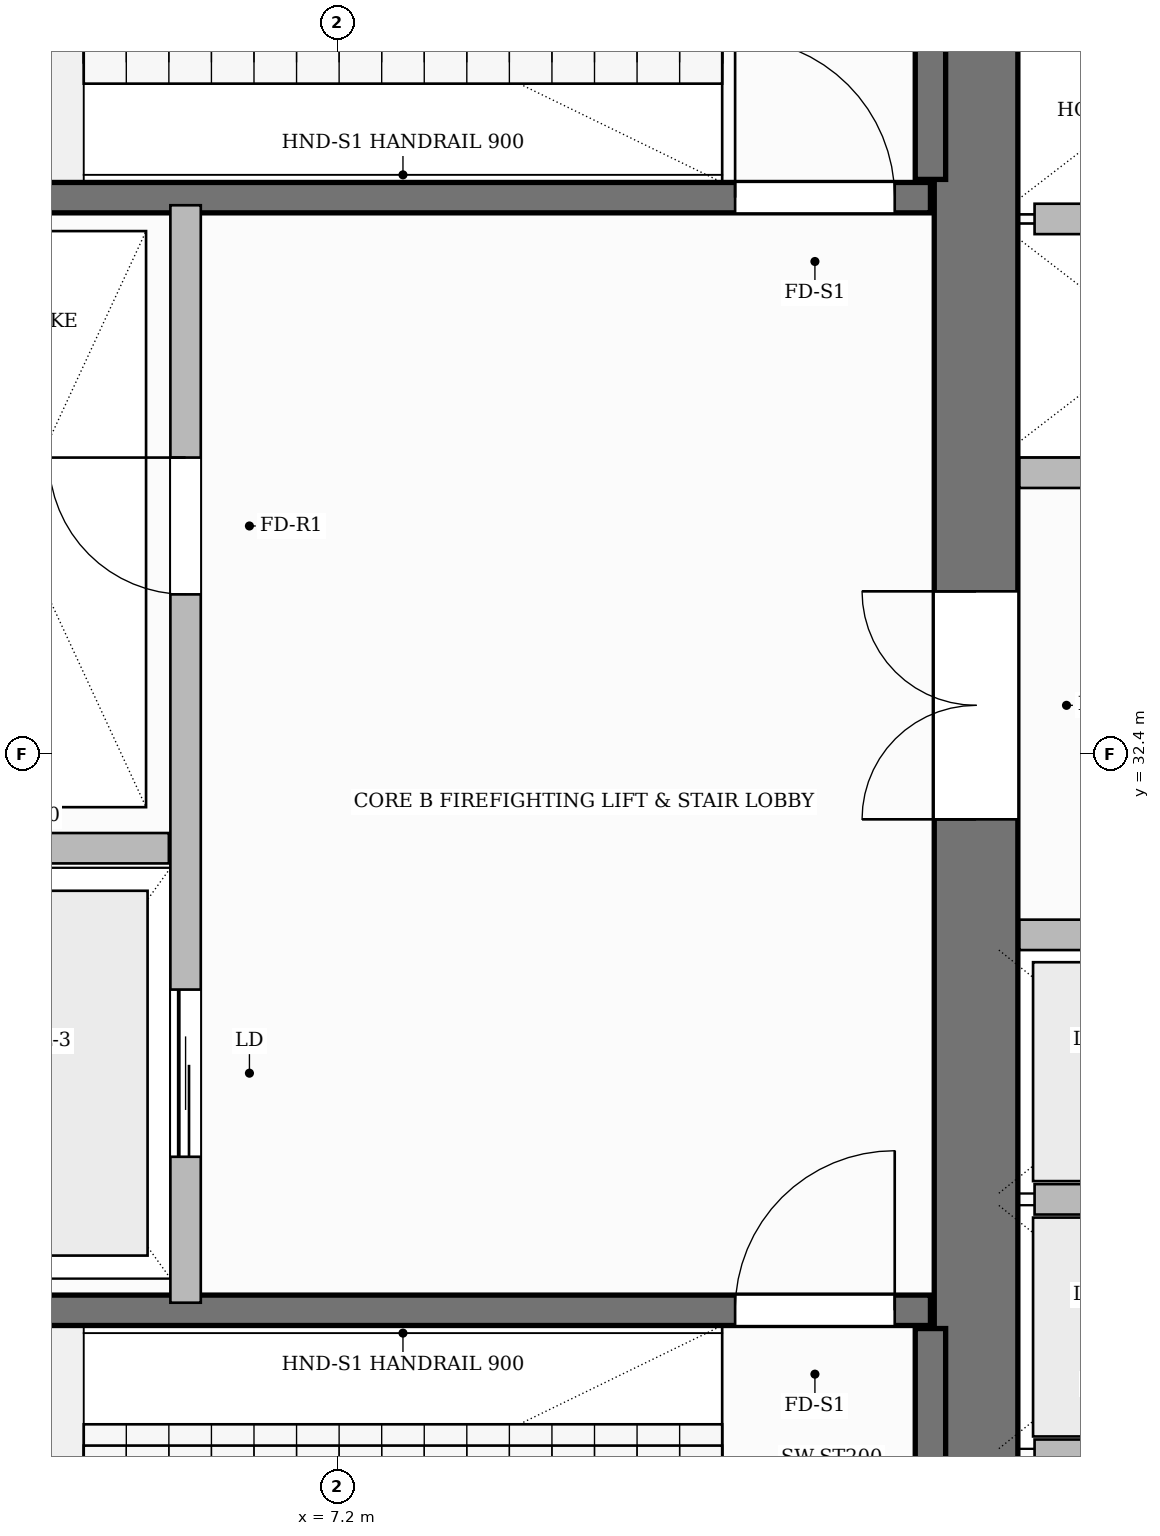
"""IFC4 building model, lengths in metres.
Left out: names, types, materials, properties, quantities, classifications, styles, units other than length and angle.
Written with IfcOpenShell. Run it as: python <this file> out.ifc"""

import sys

from ifc_helpers import new_model, si_unit, direction, frame, frame_2d, origin, place, context, subcontext, project, spatial, rectangle, extrude, source, transform, mapped, element, fill, save


model = new_model("IFC4")
c1 = context("Model", 3, precision=1e-05, world=origin(), true_north=direction((0.0, 1.0)))
c2 = subcontext(c1, "Body", "Model", "MODEL_VIEW")
j1 = project(units=[si_unit("LENGTHUNIT", "METRE"), si_unit("PLANEANGLEUNIT", "RADIAN")], contexts=[c1])
p1 = place(None, origin())
s1 = spatial("IfcSite", under=j1, at=p1, CompositionType="ELEMENT")
p2 = place(p1, origin())
s2 = spatial("IfcBuilding", under=s1, at=p2, CompositionType="ELEMENT")
p3 = place(p2, frame((0.0, 0.0, 27.0)))
s3 = spatial("IfcBuildingStorey", under=s2, at=p3, CompositionType="ELEMENT", Elevation=27.0)
p4 = place(p3, frame((11.4, 25.5, 0.0), z_axis=(0.0, 0.0, 1.0), x_axis=(0.0, 1.0, 0.0)))
e1 = element("IfcWall", 1, at=p4, inside=s3, PredefinedType="SHEAR", context=c2, shape_type="SweptSolid", body=[
    extrude(rectangle(XDim=13.8, YDim=0.6, at=frame_2d((6.9, 0.0))), origin(), (0.0, 0.0, 1.0), 5.4),
])
p5 = place(p4, frame((6.47, 0.0, 0.0)))
e2 = element("IfcOpeningElement", 2, at=p5, cuts=e1, PredefinedType="OPENING", context=c2, shape_type="SweptSolid", body=[
    extrude(rectangle(XDim=1.5, YDim=2.2, at=frame_2d((0.75, 1.1))), frame((0.0, 0.31, 0.0), z_axis=(0.0, -1.0, 0.0), x_axis=(1.0, 0.0, 0.0)), (0.0, 0.0, 1.0), 0.62),
])
p6 = place(p3, frame((11.1, 25.92, 0.0), z_axis=(0.0, 0.0, 1.0), x_axis=(0.0, 1.0, 0.0)))
e3 = element("IfcWall", 3, at=p6, inside=s3, PredefinedType="SHEAR", context=c2, shape_type="SweptSolid", body=[
    extrude(rectangle(XDim=2.7, YDim=0.2, at=frame_2d((1.35, 0.0))), origin(), (0.0, 0.0, 1.0), 5.4),
])
p7 = place(p3, frame((4.0, 28.74, 0.0), z_axis=(0.0, 0.0, 1.0), x_axis=(1.0, 0.0, 0.0)))
e4 = element("IfcWall", 4, at=p7, inside=s3, PredefinedType="SHEAR", context=c2, shape_type="SweptSolid", body=[
    extrude(rectangle(XDim=7.1, YDim=0.2, at=frame_2d((3.55, 0.0))), origin(), (0.0, 0.0, 1.0), 5.4),
])
p8 = place(p7, frame((5.815, 0.0, 0.0)))
e5 = element("IfcOpeningElement", 5, at=p8, cuts=e4, PredefinedType="OPENING", context=c2, shape_type="SweptSolid", body=[
    extrude(rectangle(XDim=1.05, YDim=2.2, at=frame_2d((0.525, 1.1))), frame((0.0, 0.11, 0.0), z_axis=(0.0, -1.0, 0.0), x_axis=(1.0, 0.0, 0.0)), (0.0, 0.0, 1.0), 0.22),
])
p9 = place(p3, frame((11.1, 36.18, 0.0), z_axis=(0.0, 0.0, 1.0), x_axis=(0.0, 1.0, 0.0)))
e6 = element("IfcWall", 6, at=p9, inside=s3, PredefinedType="SHEAR", context=c2, shape_type="SweptSolid", body=[
    extrude(rectangle(XDim=2.7, YDim=0.2, at=frame_2d((1.35, 0.0))), origin(), (0.0, 0.0, 1.0), 5.4),
])
p10 = place(p3, frame((4.0, 36.06, 0.0), z_axis=(0.0, 0.0, 1.0), x_axis=(1.0, 0.0, 0.0)))
e7 = element("IfcWall", 7, at=p10, inside=s3, PredefinedType="SHEAR", context=c2, shape_type="SweptSolid", body=[
    extrude(rectangle(XDim=7.1, YDim=0.2, at=frame_2d((3.55, 0.0))), origin(), (0.0, 0.0, 1.0), 5.4),
])
p11 = place(p10, frame((5.815, 0.0, 0.0)))
e8 = element("IfcOpeningElement", 8, at=p11, cuts=e7, PredefinedType="OPENING", context=c2, shape_type="SweptSolid", body=[
    extrude(rectangle(XDim=1.05, YDim=2.2, at=frame_2d((0.525, 1.1))), frame((0.0, 0.11, 0.0), z_axis=(0.0, -1.0, 0.0), x_axis=(1.0, 0.0, 0.0)), (0.0, 0.0, 1.0), 0.22),
])
p12 = place(p3, frame((6.2, 28.79, 0.0), z_axis=(0.0, 0.0, 1.0), x_axis=(0.0, 1.0, 0.0)))
e9 = element("IfcWall", 9, at=p12, inside=s3, PredefinedType="PARTITIONING", context=c2, shape_type="SweptSolid", body=[
    extrude(rectangle(XDim=7.22, YDim=0.2, at=frame_2d((3.61, 0.0))), origin(), (0.0, 0.0, 1.0), 5.15),
])
p13 = place(p12, frame((4.66, 0.0, 0.0)))
e10 = element("IfcOpeningElement", 10, at=p13, cuts=e9, PredefinedType="OPENING", context=c2, shape_type="SweptSolid", body=[
    extrude(rectangle(XDim=0.9, YDim=2.1, at=frame_2d((0.45, 1.05))), frame((0.0, 0.11, 0.0), z_axis=(0.0, -1.0, 0.0), x_axis=(1.0, 0.0, 0.0)), (0.0, 0.0, 1.0), 0.22),
])
p14 = place(p12, frame((0.96, 0.0, 0.0)))
e11 = element("IfcOpeningElement", 11, at=p14, cuts=e9, PredefinedType="OPENING", context=c2, shape_type="SweptSolid", body=[
    extrude(rectangle(XDim=1.1, YDim=2.2, at=frame_2d((0.55, 1.1))), frame((0.0, 0.11, 0.0), z_axis=(0.0, -1.0, 0.0), x_axis=(1.0, 0.0, 0.0)), (0.0, 0.0, 1.0), 0.22),
])
p15 = place(p3, frame((3.96, 31.78, 0.0), z_axis=(0.0, 0.0, 1.0), x_axis=(1.0, 0.0, 0.0)))
e12 = element("IfcWall", 12, at=p15, inside=s3, PredefinedType="PARTITIONING", context=c2, shape_type="SweptSolid", body=[
    extrude(rectangle(XDim=2.13, YDim=0.2, at=frame_2d((1.065, 0.0))), origin(), (0.0, 0.0, 1.0), 5.15),
])
p16 = place(p3, frame((11.71, 31.21, 0.0), z_axis=(0.0, 0.0, 1.0), x_axis=(1.0, 0.0, 0.0)))
e13 = element("IfcWall", 13, at=p16, inside=s3, PredefinedType="PARTITIONING", context=c2, shape_type="SweptSolid", body=[
    extrude(rectangle(XDim=1.96, YDim=0.2, at=frame_2d((0.98, 0.0))), origin(), (0.0, 0.0, 1.0), 5.15),
])
for number, where, z_axis, x_axis in (
    (14, (11.81, 27.79, 0.0), (0.0, 0.0, 1.0), (1.0, 0.0, 0.0)),
    (15, (11.81, 29.47, 0.0), (0.0, 0.0, 1.0), (1.0, 0.0, 0.0)),
):
    element("IfcWall", number, at=place(p3, frame(where, z_axis=z_axis, x_axis=x_axis)), inside=s3, PredefinedType="PARTITIONING", context=c2, shape_type="SweptSolid", body=[
        extrude(rectangle(XDim=1.76, YDim=0.2, at=frame_2d((0.88, 0.0))), origin(), (0.0, 0.0, 1.0), 5.15),
    ])
p17 = place(p3, frame((11.71, 34.25, 0.0), z_axis=(0.0, 0.0, 1.0), x_axis=(1.0, 0.0, 0.0)))
e16 = element("IfcWall", 16, at=p17, inside=s3, PredefinedType="PARTITIONING", context=c2, shape_type="SweptSolid", body=[
    extrude(rectangle(XDim=1.96, YDim=0.2, at=frame_2d((0.98, 0.0))), origin(), (0.0, 0.0, 1.0), 5.15),
])
p18 = place(p3, frame((11.81, 35.92, 0.0), z_axis=(0.0, 0.0, 1.0), x_axis=(1.0, 0.0, 0.0)))
e17 = element("IfcWall", 17, at=p18, inside=s3, PredefinedType="PARTITIONING", context=c2, shape_type="SweptSolid", body=[
    extrude(rectangle(XDim=1.76, YDim=0.2, at=frame_2d((0.88, 0.0))), origin(), (0.0, 0.0, 1.0), 5.15),
])
m1 = source(origin(), c2, "Body", "SweptSolid", [
    extrude(rectangle(XDim=1.05, YDim=2.2, at=frame_2d((0.525, 1.1))), frame((0.0, 0.025, 0.0), z_axis=(0.0, -1.0, 0.0), x_axis=(1.0, 0.0, 0.0)), (0.0, 0.0, 1.0), 0.05),
])
p19 = place(p8, origin())
e18 = element("IfcDoor", 18, at=p19, inside=s3, OperationType="SINGLE_SWING_RIGHT", PredefinedType="DOOR", context=c2, shape_type="MappedRepresentation", body=[
    mapped(m1, transform((0.0, 0.0, 0.0), scale=1.0)),
])
fill(e5, e18)
p20 = place(p11, origin())
e19 = element("IfcDoor", 19, at=p20, inside=s3, OperationType="SINGLE_SWING_LEFT", PredefinedType="DOOR", context=c2, shape_type="MappedRepresentation", body=[
    mapped(m1, transform((0.0, 0.0, 0.0), scale=1.0)),
])
fill(e8, e19)
m2 = source(origin(), c2, "Body", "SweptSolid", [
    extrude(rectangle(XDim=0.9, YDim=2.1, at=frame_2d((0.45, 1.05))), frame((0.0, 0.025, 0.0), z_axis=(0.0, -1.0, 0.0), x_axis=(1.0, 0.0, 0.0)), (0.0, 0.0, 1.0), 0.05),
])
p21 = place(p13, origin())
e20 = element("IfcDoor", 20, at=p21, inside=s3, OperationType="SINGLE_SWING_RIGHT", PredefinedType="DOOR", context=c2, shape_type="MappedRepresentation", body=[
    mapped(m2, transform((0.0, 0.0, 0.0), scale=1.0)),
])
fill(e10, e20)
m3 = source(origin(), c2, "Body", "SweptSolid", [
    extrude(rectangle(XDim=1.5, YDim=2.2, at=frame_2d((0.75, 1.1))), frame((0.0, 0.025, 0.0), z_axis=(0.0, -1.0, 0.0), x_axis=(1.0, 0.0, 0.0)), (0.0, 0.0, 1.0), 0.05),
])
p22 = place(p5, origin())
e21 = element("IfcDoor", 21, at=p22, inside=s3, OperationType="DOUBLE_DOOR_SINGLE_SWING", PredefinedType="DOOR", context=c2, shape_type="MappedRepresentation", body=[
    mapped(m3, transform((0.0, 0.0, 0.0), scale=1.0)),
])
fill(e2, e21)
m4 = source(origin(), c2, "Body", "SweptSolid", [
    extrude(rectangle(XDim=1.1, YDim=2.2, at=frame_2d((0.55, 1.1))), frame((0.0, 0.025, 0.0), z_axis=(0.0, -1.0, 0.0), x_axis=(1.0, 0.0, 0.0)), (0.0, 0.0, 1.0), 0.05),
])
p23 = place(p14, origin())
e22 = element("IfcDoor", 22, at=p23, inside=s3, OperationType="SLIDING_TO_LEFT", PredefinedType="DOOR", context=c2, shape_type="MappedRepresentation", body=[
    mapped(m4, transform((0.0, 0.0, 0.0), scale=1.0)),
])
fill(e11, e22)
save(model, sys.argv[1])
